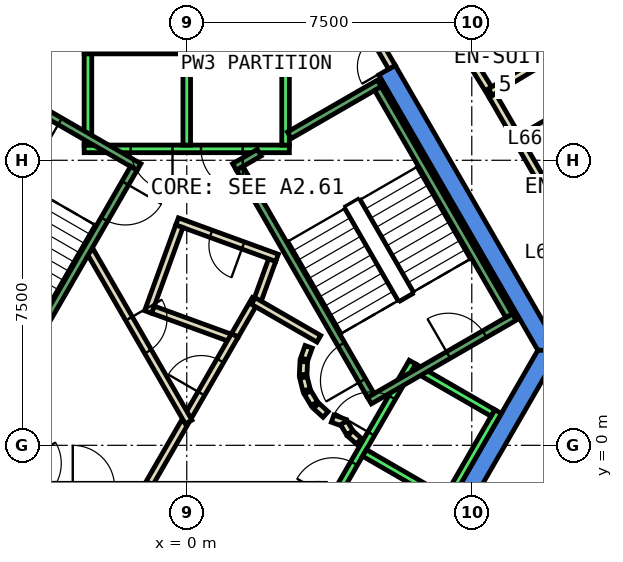
"""IFC4 building model, lengths in metres.
Left out: names, types, materials, properties, quantities, classifications, styles, units other than length and angle.
Written with IfcOpenShell. Run it as: python <this file> out.ifc"""

import sys

from ifc_helpers import new_model, si_unit, direction, frame, frame_2d, origin, place, context, subcontext, project, spatial, polyline, rectangle, outline, extrude, element, fill, save


model = new_model("IFC4")
c1 = context("Model", 3, precision=1e-05, world=origin(), true_north=direction((0.0, 1.0)))
c2 = subcontext(c1, "Body", "Model", "MODEL_VIEW")
j1 = project(units=[si_unit("LENGTHUNIT", "METRE"), si_unit("PLANEANGLEUNIT", "RADIAN")], contexts=[c1])
p1 = place(None, origin())
s1 = spatial("IfcSite", under=j1, at=p1, CompositionType="ELEMENT")
p2 = place(p1, origin())
s2 = spatial("IfcBuilding", under=s1, at=p2, CompositionType="ELEMENT")
p3 = place(p2, frame((0.0, 0.0, 286.4)))
s3 = spatial("IfcBuildingStorey", under=s2, at=p3, CompositionType="ELEMENT", Elevation=286.4)
p4 = place(p3, frame((0.0, 0.0, -0.6)))
e1 = element("IfcWall", 1, at=p4, inside=s3, PredefinedType="SHEAR", context=c2, shape_type="SweptSolid", body=[
    extrude(outline(polyline([(5.486, 9.998), (5.053, 9.748), (9.238, 2.5), (9.815, 2.5), (5.486, 9.998)])), origin(), (0.0, 0.0, 1.0), 3.86),
])
p5 = place(p3, frame((0.0, 0.0, -0.6)))
e2 = element("IfcWall", 2, at=p5, inside=s3, PredefinedType="SHEAR", context=c2, shape_type="SweptSolid", body=[
    extrude(outline(polyline([(4.907, -6.0), (9.815, 2.5), (9.238, 2.5), (4.619, -5.5), (4.907, -6.0)])), origin(), (0.0, 0.0, 1.0), 3.86),
])
p6 = place(p3, frame((1.264, 2.89, 0.0), z_axis=(0.0, 0.0, 1.0), x_axis=(0.500043792738, 0.866000118559, 0.0)))
e3 = element("IfcWall", 3, at=p6, inside=s3, PredefinedType="PARTITIONING", context=c2, shape_type="SweptSolid", body=[
    extrude(rectangle(XDim=1.096, YDim=0.2, at=frame_2d((0.548, 0.0))), origin(), (0.0, 0.0, 1.0), 3.26),
])
p7 = place(p3, frame((1.838, 3.748, 0.0), z_axis=(0.0, 0.0, 1.0), x_axis=(0.342266462435, 0.939602931398, 0.0)))
e4 = element("IfcWall", 4, at=p7, inside=s3, PredefinedType="PARTITIONING", context=c2, shape_type="SweptSolid", body=[
    extrude(rectangle(XDim=1.198, YDim=0.2, at=frame_2d((0.599, 0.0))), origin(), (0.0, 0.0, 1.0), 3.26),
])
p8 = place(p3, frame((2.376, 4.934, 0.0), z_axis=(0.0, 0.0, 1.0), x_axis=(-0.939640574808, 0.342163104635, 0.0)))
e5 = element("IfcWall", 5, at=p8, inside=s3, PredefinedType="PARTITIONING", context=c2, shape_type="SweptSolid", body=[
    extrude(rectangle(XDim=2.8, YDim=0.2, at=frame_2d((1.4, 0.0))), origin(), (0.0, 0.0, 1.0), 3.26),
])
p9 = place(p8, frame((0.95, 0.0, 0.0)))
e6 = element("IfcOpeningElement", 6, at=p9, cuts=e5, PredefinedType="OPENING", context=c2, shape_type="SweptSolid", body=[
    extrude(rectangle(XDim=0.9, YDim=2.1, at=frame_2d((0.45, 1.05))), frame((0.0, 0.11, 0.0), z_axis=(0.0, -1.0, 0.0), x_axis=(1.0, 0.0, 0.0)), (0.0, 0.0, 1.0), 0.22),
])
p10 = place(p3, frame((-0.196, 5.764, 0.0), z_axis=(0.0, 0.0, 1.0), x_axis=(-0.34165322761, -0.939826086073, 0.0)))
e7 = element("IfcWall", 7, at=p10, inside=s3, PredefinedType="PARTITIONING", context=c2, shape_type="SweptSolid", body=[
    extrude(rectangle(XDim=2.4, YDim=0.2, at=frame_2d((1.2, 0.0))), origin(), (0.0, 0.0, 1.0), 3.26),
])
p11 = place(p3, frame((-0.888, 3.568, 0.0), z_axis=(0.0, 0.0, 1.0), x_axis=(0.939685034098, -0.34204098686, 0.0)))
e8 = element("IfcWall", 8, at=p11, inside=s3, PredefinedType="PARTITIONING", context=c2, shape_type="SweptSolid", body=[
    extrude(rectangle(XDim=2.237, YDim=0.2, at=frame_2d((1.119, 0.0))), origin(), (0.0, 0.0, 1.0), 3.26),
])
p12 = place(p3, frame((8.039, 9.209, 0.0), z_axis=(0.0, 0.0, 1.0), x_axis=(0.500219543227, -0.865898613334, 0.0)))
e9 = element("IfcWall", 9, at=p12, inside=s3, PredefinedType="PARTITIONING", context=c2, shape_type="SweptSolid", body=[
    extrude(rectangle(XDim=1.261, YDim=0.2, at=frame_2d((0.631, 0.0))), origin(), (0.0, 0.0, 1.0), 3.26),
])
p13 = place(p3, frame((8.67, 8.117, 0.0), z_axis=(0.0, 0.0, 1.0), x_axis=(0.50002537861, -0.866010750942, 0.0)))
e10 = element("IfcWall", 10, at=p13, inside=s3, PredefinedType="PARTITIONING", context=c2, shape_type="SweptSolid", body=[
    extrude(rectangle(XDim=3.0, YDim=0.2, at=frame_2d((1.5, 0.0))), origin(), (0.0, 0.0, 1.0), 3.26),
])
p14 = place(p3, frame((6.775, 11.249, 0.0), z_axis=(0.0, 0.0, 1.0), x_axis=(0.527803270752, -0.849366650736, 0.0)))
e11 = element("IfcWall", 11, at=p14, inside=s3, PredefinedType="PARTITIONING", context=c2, shape_type="SweptSolid", body=[
    extrude(rectangle(XDim=2.401, YDim=0.2, at=frame_2d((1.2, 0.0))), origin(), (0.0, 0.0, 1.0), 3.26),
])
p15 = place(p3, frame((-0.982, -1.0, 0.0), z_axis=(0.0, 0.0, 1.0), x_axis=(0.50024047865, 0.865886518847, 0.0)))
e12 = element("IfcWall", 12, at=p15, inside=s3, PredefinedType="PARTITIONING", context=c2, shape_type="SweptSolid", body=[
    extrude(rectangle(XDim=1.863, YDim=0.2, at=frame_2d((0.931, 0.0))), origin(), (0.0, 0.0, 1.0), 3.26),
])
p16 = place(p3, frame((0.05, 0.787, 0.0), z_axis=(0.0, 0.0, 1.0), x_axis=(0.499945861543, 0.866056658381, 0.0)))
e13 = element("IfcWall", 13, at=p16, inside=s3, PredefinedType="PARTITIONING", context=c2, shape_type="SweptSolid", body=[
    extrude(rectangle(XDim=2.428, YDim=0.2, at=frame_2d((1.214, 0.0))), origin(), (0.0, 0.0, 1.0), 3.26),
])
p17 = place(p16, frame((0.664, 0.0, 0.0)))
e14 = element("IfcOpeningElement", 14, at=p17, cuts=e13, PredefinedType="OPENING", context=c2, shape_type="SweptSolid", body=[
    extrude(rectangle(XDim=1.0, YDim=2.1, at=frame_2d((0.5, 1.05))), frame((0.0, 0.11, 0.0), z_axis=(0.0, -1.0, 0.0), x_axis=(1.0, 0.0, 0.0)), (0.0, 0.0, 1.0), 0.22),
])
p18 = place(p3, frame((1.751, 3.798, 0.0), z_axis=(0.0, 0.0, 1.0), x_axis=(0.866091650241, -0.499885240213, 0.0)))
e15 = element("IfcWall", 15, at=p18, inside=s3, PredefinedType="PARTITIONING", context=c2, shape_type="SweptSolid", body=[
    extrude(rectangle(XDim=1.991, YDim=0.2, at=frame_2d((0.995, 0.0))), origin(), (0.0, 0.0, 1.0), 3.26),
])
p19 = place(p3, frame((3.208, 2.592, 0.0), z_axis=(0.0, 0.0, 1.0), x_axis=(-0.337388820924, -0.941365382578, 0.0)))
e16 = element("IfcWall", 16, at=p19, inside=s3, PredefinedType="PARTITIONING", context=c2, shape_type="SweptSolid", body=[
    extrude(rectangle(XDim=0.338, YDim=0.2, at=frame_2d((0.169, 0.0))), origin(), (0.0, 0.0, 1.0), 3.26),
])
p20 = place(p3, frame((3.079, 2.199, 0.0), z_axis=(0.0, 0.0, 1.0), x_axis=(-0.047771483479, -0.998858290933, 0.0)))
e17 = element("IfcWall", 17, at=p20, inside=s3, PredefinedType="PARTITIONING", context=c2, shape_type="SweptSolid", body=[
    extrude(rectangle(XDim=0.337, YDim=0.2, at=frame_2d((0.169, 0.0))), origin(), (0.0, 0.0, 1.0), 3.26),
])
p21 = place(p3, frame((3.07, 1.786, 0.0), z_axis=(0.0, 0.0, 1.0), x_axis=(0.242705583207, -0.970099994784, 0.0)))
e18 = element("IfcWall", 18, at=p21, inside=s3, PredefinedType="PARTITIONING", context=c2, shape_type="SweptSolid", body=[
    extrude(rectangle(XDim=0.338, YDim=0.2, at=frame_2d((0.169, 0.0))), origin(), (0.0, 0.0, 1.0), 3.26),
])
for number, where, z_axis, x_axis in (
    (19, (3.182, 1.388, 0.0), (0.0, 0.0, 1.0), (0.512, -0.859, 0.0)),
    (20, (3.404, 1.039, 0.0), (0.0, 0.0, 1.0), (0.74, -0.672, 0.0)),
):
    element("IfcWall", number, at=place(p3, frame(where, z_axis=z_axis, x_axis=x_axis)), inside=s3, PredefinedType="PARTITIONING", context=c2, shape_type="SweptSolid", body=[
        extrude(rectangle(XDim=0.338, YDim=0.2, at=frame_2d((0.169, 0.0))), origin(), (0.0, 0.0, 1.0), 3.26),
    ])
p22 = place(p3, frame((3.838, 0.702, 0.0), z_axis=(0.0, 0.0, 1.0), x_axis=(0.941035081519, -0.338308993895, 0.0)))
e21 = element("IfcWall", 21, at=p22, inside=s3, PredefinedType="PARTITIONING", context=c2, shape_type="SweptSolid", body=[
    extrude(rectangle(XDim=0.337, YDim=0.2, at=frame_2d((0.168, 0.0))), origin(), (0.0, 0.0, 1.0), 3.26),
])
p23 = place(p3, frame((4.132, 0.593, 0.0), z_axis=(0.0, 0.0, 1.0), x_axis=(0.513561617048, -0.858052717201, 0.0)))
e22 = element("IfcWall", 22, at=p23, inside=s3, PredefinedType="PARTITIONING", context=c2, shape_type="SweptSolid", body=[
    extrude(rectangle(XDim=0.308, YDim=0.2, at=frame_2d((0.154, 0.0))), origin(), (0.0, 0.0, 1.0), 3.26),
])
p24 = place(p3, frame((4.301, 0.315, 0.0), z_axis=(0.0, 0.0, 1.0), x_axis=(0.741798017506, -0.670623367639, 0.0)))
e23 = element("IfcWall", 23, at=p24, inside=s3, PredefinedType="PARTITIONING", context=c2, shape_type="SweptSolid", body=[
    extrude(rectangle(XDim=0.309, YDim=0.2, at=frame_2d((0.154, 0.0))), origin(), (0.0, 0.0, 1.0), 3.26),
])
p25 = place(p3, frame((-2.54, 5.1, 0.0), z_axis=(0.0, 0.0, 1.0), x_axis=(0.499925051871, -0.866068670783, 0.0)))
e24 = element("IfcWall", 24, at=p25, inside=s3, PredefinedType="PARTITIONING", context=c2, shape_type="SweptSolid", body=[
    extrude(rectangle(XDim=5.181, YDim=0.2, at=frame_2d((2.59, 0.0))), origin(), (0.0, 0.0, 1.0), 3.26),
])
p26 = place(p25, frame((2.04, 0.0, 0.0)))
e25 = element("IfcOpeningElement", 25, at=p26, cuts=e24, PredefinedType="OPENING", context=c2, shape_type="SweptSolid", body=[
    extrude(rectangle(XDim=1.0, YDim=2.1, at=frame_2d((0.5, 1.05))), frame((0.0, 0.11, 0.0), z_axis=(0.0, -1.0, 0.0), x_axis=(1.0, 0.0, 0.0)), (0.0, 0.0, 1.0), 0.22),
])
p27 = place(p3, frame((10.885, 9.28, 0.0), z_axis=(0.0, 0.0, 1.0), x_axis=(-0.866022959057, -0.500004234368, 0.0)))
e26 = element("IfcWall", 26, at=p27, inside=s3, PredefinedType="PARTITIONING", context=c2, shape_type="SweptSolid", body=[
    extrude(rectangle(XDim=2.5, YDim=0.2, at=frame_2d((1.25, 0.0))), origin(), (0.0, 0.0, 1.0), 3.26),
])
p28 = place(p3, frame((7.989, 9.295, 0.0), z_axis=(0.0, 0.0, 1.0), x_axis=(0.857801856135, 0.513980520654, 0.0)))
e27 = element("IfcWall", 27, at=p28, inside=s3, PredefinedType="PARTITIONING", context=c2, shape_type="SweptSolid", body=[
    extrude(rectangle(XDim=2.3, YDim=0.2, at=frame_2d((1.15, 0.0))), origin(), (0.0, 0.0, 1.0), 3.26),
])
p29 = place(p3, frame((5.399, 9.948, 0.0), z_axis=(0.0, 0.0, 1.0), x_axis=(-0.499882215713, 0.866093395895, 0.0)))
e28 = element("IfcWall", 28, at=p29, inside=s3, PredefinedType="PARTITIONING", context=c2, shape_type="SweptSolid", body=[
    extrude(rectangle(XDim=0.926, YDim=0.2, at=frame_2d((0.463, 0.0))), origin(), (0.0, 0.0, 1.0), 2.4),
])
p30 = place(p29, frame((0.017, 0.0, 0.0)))
e29 = element("IfcOpeningElement", 29, at=p30, cuts=e28, PredefinedType="OPENING", context=c2, shape_type="SweptSolid", body=[
    extrude(rectangle(XDim=0.9, YDim=2.1, at=frame_2d((0.45, 1.05))), frame((0.0, 0.11, 0.0), z_axis=(0.0, -1.0, 0.0), x_axis=(1.0, 0.0, 0.0)), (0.0, 0.0, 1.0), 0.22),
])
p31 = place(p3, frame((2.7, 7.8, 0.0), z_axis=(0.0, 0.0, 1.0), x_axis=(-1.0, 0.0, 0.0)))
e30 = element("IfcWall", 30, at=p31, inside=s3, PredefinedType="STANDARD", context=c2, shape_type="SweptSolid", body=[
    extrude(rectangle(XDim=5.4, YDim=0.2, at=frame_2d((2.7, 0.0))), origin(), (0.0, 0.0, 1.0), 3.26),
])
p32 = place(p31, frame((1.225, 0.0, 0.0)))
e31 = element("IfcOpeningElement", 31, at=p32, cuts=e30, PredefinedType="OPENING", context=c2, shape_type="SweptSolid", body=[
    extrude(rectangle(XDim=1.1, YDim=2.1, at=frame_2d((0.55, 1.05))), frame((0.0, 0.11, 0.0), z_axis=(0.0, -1.0, 0.0), x_axis=(1.0, 0.0, 0.0)), (0.0, 0.0, 1.0), 0.22),
])
p33 = place(p31, frame((3.075, 0.0, 0.0)))
e32 = element("IfcOpeningElement", 32, at=p33, cuts=e30, PredefinedType="OPENING", context=c2, shape_type="SweptSolid", body=[
    extrude(rectangle(XDim=1.1, YDim=2.1, at=frame_2d((0.55, 1.05))), frame((0.0, 0.11, 0.0), z_axis=(0.0, -1.0, 0.0), x_axis=(1.0, 0.0, 0.0)), (0.0, 0.0, 1.0), 0.22),
])
p34 = place(p3, frame((2.7, 10.4, 0.0), z_axis=(0.0, 0.0, 1.0), x_axis=(-1.0, 0.0, 0.0)))
e33 = element("IfcWall", 33, at=p34, inside=s3, PredefinedType="STANDARD", context=c2, shape_type="SweptSolid", body=[
    extrude(rectangle(XDim=5.4, YDim=0.2, at=frame_2d((2.7, 0.0))), origin(), (0.0, 0.0, 1.0), 3.26),
])
for number, where, z_axis, x_axis in (
    (34, (2.6, 7.9, 0.0), (0.0, 0.0, 1.0), (0.0, 1.0, 0.0)),
    (35, (0.0, 7.9, 0.0), (0.0, 0.0, 1.0), (0.0, 1.0, 0.0)),
    (36, (-2.6, 7.9, 0.0), (0.0, 0.0, 1.0), (0.0, 1.0, 0.0)),
):
    element("IfcWall", number, at=place(p3, frame(where, z_axis=z_axis, x_axis=x_axis)), inside=s3, PredefinedType="STANDARD", context=c2, shape_type="SweptSolid", body=[
        extrude(rectangle(XDim=2.4, YDim=0.2, at=frame_2d((1.2, 0.0))), origin(), (0.0, 0.0, 1.0), 3.26),
    ])
p35 = place(p3, frame((-5.94, 2.188, 0.0), z_axis=(0.0, 0.0, 1.0), x_axis=(0.500034260056, -0.866005622828, 0.0)))
e37 = element("IfcWall", 37, at=p35, inside=s3, PredefinedType="STANDARD", context=c2, shape_type="SweptSolid", body=[
    extrude(rectangle(XDim=5.399, YDim=0.2, at=frame_2d((2.7, 0.0))), origin(), (0.0, 0.0, 1.0), 3.26),
])
p36 = place(p35, frame((3.075, 0.0, 0.0)))
e38 = element("IfcOpeningElement", 38, at=p36, cuts=e37, PredefinedType="OPENING", context=c2, shape_type="SweptSolid", body=[
    extrude(rectangle(XDim=1.1, YDim=2.1, at=frame_2d((0.55, 1.05))), frame((0.0, 0.11, 0.0), z_axis=(0.0, -1.0, 0.0), x_axis=(1.0, 0.0, 0.0)), (0.0, 0.0, 1.0), 0.22),
])
p37 = place(p35, frame((1.225, 0.0, 0.0)))
e39 = element("IfcOpeningElement", 39, at=p37, cuts=e37, PredefinedType="OPENING", context=c2, shape_type="SweptSolid", body=[
    extrude(rectangle(XDim=1.1, YDim=2.1, at=frame_2d((0.55, 1.05))), frame((0.0, 0.11, 0.0), z_axis=(0.0, -1.0, 0.0), x_axis=(1.0, 0.0, 0.0)), (0.0, 0.0, 1.0), 0.22),
])
p38 = place(p3, frame((3.24, -2.488, 0.0), z_axis=(0.0, 0.0, 1.0), x_axis=(0.500034260056, 0.866005622828, 0.0)))
e40 = element("IfcWall", 40, at=p38, inside=s3, PredefinedType="STANDARD", context=c2, shape_type="SweptSolid", body=[
    extrude(rectangle(XDim=5.399, YDim=0.2, at=frame_2d((2.7, 0.0))), origin(), (0.0, 0.0, 1.0), 3.26),
])
p39 = place(p38, frame((3.225, 0.0, 0.0)))
e41 = element("IfcOpeningElement", 41, at=p39, cuts=e40, PredefinedType="OPENING", context=c2, shape_type="SweptSolid", body=[
    extrude(rectangle(XDim=1.1, YDim=2.1, at=frame_2d((0.55, 1.05))), frame((0.0, 0.11, 0.0), z_axis=(0.0, -1.0, 0.0), x_axis=(1.0, 0.0, 0.0)), (0.0, 0.0, 1.0), 0.22),
])
p40 = place(p38, frame((1.225, 0.0, 0.0)))
e42 = element("IfcOpeningElement", 42, at=p40, cuts=e40, PredefinedType="OPENING", context=c2, shape_type="SweptSolid", body=[
    extrude(rectangle(XDim=1.1, YDim=2.1, at=frame_2d((0.55, 1.05))), frame((0.0, 0.11, 0.0), z_axis=(0.0, -1.0, 0.0), x_axis=(1.0, 0.0, 0.0)), (0.0, 0.0, 1.0), 0.22),
])
p41 = place(p3, frame((5.492, -3.788, 0.0), z_axis=(0.0, 0.0, 1.0), x_axis=(0.500034260056, 0.866005622828, 0.0)))
e43 = element("IfcWall", 43, at=p41, inside=s3, PredefinedType="STANDARD", context=c2, shape_type="SweptSolid", body=[
    extrude(rectangle(XDim=5.399, YDim=0.2, at=frame_2d((2.7, 0.0))), origin(), (0.0, 0.0, 1.0), 3.26),
])
for number, where, z_axis, x_axis in (
    (44, (4.677, -0.2, 0.0), (0.0, 0.0, 1.0), (0.866, -0.5, 0.0)),
    (45, (5.977, 2.052, 0.0), (0.0, 0.0, 1.0), (0.866, -0.5, 0.0)),
):
    element("IfcWall", number, at=place(p3, frame(where, z_axis=z_axis, x_axis=x_axis)), inside=s3, PredefinedType="STANDARD", context=c2, shape_type="SweptSolid", body=[
        extrude(rectangle(XDim=2.399, YDim=0.2, at=frame_2d((1.2, 0.0))), origin(), (0.0, 0.0, 1.0), 3.26),
    ])
p42 = place(p3, frame((4.806, 1.176, 0.0), z_axis=(0.0, 0.0, 1.0), x_axis=(0.866059941101, 0.499940174841, 0.0)))
e46 = element("IfcWall", 46, at=p42, inside=s3, PredefinedType="STANDARD", context=c2, shape_type="SweptSolid", body=[
    extrude(rectangle(XDim=4.4, YDim=0.2, at=frame_2d((2.2, 0.0))), origin(), (0.0, 0.0, 1.0), 3.26),
])
p43 = place(p42, frame((2.4, 0.0, 0.0)))
e47 = element("IfcOpeningElement", 47, at=p43, cuts=e46, PredefinedType="OPENING", context=c2, shape_type="SweptSolid", body=[
    extrude(rectangle(XDim=1.1, YDim=2.2, at=frame_2d((0.55, 1.1))), frame((0.0, 0.11, 0.0), z_axis=(0.0, -1.0, 0.0), x_axis=(1.0, 0.0, 0.0)), (0.0, 0.0, 1.0), 0.22),
])
p44 = place(p3, frame((2.7, 8.158, 0.0), z_axis=(0.0, 0.0, 1.0), x_axis=(0.86611865017, 0.499838457731, 0.0)))
e48 = element("IfcWall", 48, at=p44, inside=s3, PredefinedType="STANDARD", context=c2, shape_type="SweptSolid", body=[
    extrude(rectangle(XDim=2.733, YDim=0.2, at=frame_2d((1.366, 0.0))), origin(), (0.0, 0.0, 1.0), 3.26),
])
p45 = place(p3, frame((1.256, 7.324, 0.0), z_axis=(0.0, 0.0, 1.0), x_axis=(0.865915093549, 0.500191014278, 0.0)))
e49 = element("IfcWall", 49, at=p45, inside=s3, PredefinedType="STANDARD", context=c2, shape_type="SweptSolid", body=[
    extrude(rectangle(XDim=0.752, YDim=0.2, at=frame_2d((0.376, 0.0))), origin(), (0.0, 0.0, 1.0), 3.26),
])
p46 = place(p3, frame((4.843, 1.312, 0.0), z_axis=(0.0, 0.0, 1.0), x_axis=(-0.499963383562, 0.866046543262, 0.0)))
e50 = element("IfcWall", 50, at=p46, inside=s3, PredefinedType="STANDARD", context=c2, shape_type="SweptSolid", body=[
    extrude(rectangle(XDim=6.9, YDim=0.2, at=frame_2d((3.45, 0.0))), origin(), (0.0, 0.0, 1.0), 3.26),
])
p47 = place(p46, frame((0.45, 0.0, 0.0)))
e51 = element("IfcOpeningElement", 51, at=p47, cuts=e50, PredefinedType="OPENING", context=c2, shape_type="SweptSolid", body=[
    extrude(rectangle(XDim=1.1, YDim=2.2, at=frame_2d((0.55, 1.1))), frame((0.0, 0.11, 0.0), z_axis=(0.0, -1.0, 0.0), x_axis=(1.0, 0.0, 0.0)), (0.0, 0.0, 1.0), 0.22),
])
p48 = place(p3, frame((8.48, 3.412, 0.0), z_axis=(0.0, 0.0, 1.0), x_axis=(-0.499978703459, 0.866037698999, 0.0)))
e52 = element("IfcWall", 52, at=p48, inside=s3, PredefinedType="STANDARD", context=c2, shape_type="SweptSolid", body=[
    extrude(rectangle(XDim=6.9, YDim=0.2, at=frame_2d((3.45, 0.0))), origin(), (0.0, 0.0, 1.0), 3.26),
])
p49 = place(p3, frame((-1.256, 7.324, 0.0), z_axis=(0.0, 0.0, 1.0), x_axis=(-0.866046073146, 0.499964197906, 0.0)))
e53 = element("IfcWall", 53, at=p49, inside=s3, PredefinedType="STANDARD", context=c2, shape_type="SweptSolid", body=[
    extrude(rectangle(XDim=4.4, YDim=0.2, at=frame_2d((2.2, 0.0))), origin(), (0.0, 0.0, 1.0), 3.26),
])
p50 = place(p49, frame((2.4, 0.0, 0.0)))
e54 = element("IfcOpeningElement", 54, at=p50, cuts=e53, PredefinedType="OPENING", context=c2, shape_type="SweptSolid", body=[
    extrude(rectangle(XDim=1.1, YDim=2.2, at=frame_2d((0.55, 1.1))), frame((0.0, 0.11, 0.0), z_axis=(0.0, -1.0, 0.0), x_axis=(1.0, 0.0, 0.0)), (0.0, 0.0, 1.0), 0.22),
])
p51 = place(p3, frame((-1.393, 7.288, 0.0), z_axis=(0.0, 0.0, 1.0), x_axis=(-0.499963383562, -0.866046543262, 0.0)))
e55 = element("IfcWall", 55, at=p51, inside=s3, PredefinedType="STANDARD", context=c2, shape_type="SweptSolid", body=[
    extrude(rectangle(XDim=6.9, YDim=0.2, at=frame_2d((3.45, 0.0))), origin(), (0.0, 0.0, 1.0), 3.26),
])
p52 = place(p51, frame((0.45, 0.0, 0.0)))
e56 = element("IfcOpeningElement", 56, at=p52, cuts=e55, PredefinedType="OPENING", context=c2, shape_type="SweptSolid", body=[
    extrude(rectangle(XDim=1.1, YDim=2.2, at=frame_2d((0.55, 1.1))), frame((0.0, 0.11, 0.0), z_axis=(0.0, -1.0, 0.0), x_axis=(1.0, 0.0, 0.0)), (0.0, 0.0, 1.0), 0.22),
])
p53 = place(p17, origin())
e57 = element("IfcDoor", 57, at=p53, inside=s3, OperationType="SINGLE_SWING_RIGHT", PredefinedType="DOOR", context=c2, shape_type="SweptSolid", body=[
    extrude(rectangle(XDim=1.0, YDim=2.1, at=frame_2d((0.5, 1.05))), frame((0.0, 0.025, 0.0), z_axis=(0.0, -1.0, 0.0), x_axis=(1.0, 0.0, 0.0)), (0.0, 0.0, 1.0), 0.05),
])
fill(e14, e57)
p54 = place(p26, origin())
e58 = element("IfcDoor", 58, at=p54, inside=s3, OperationType="SINGLE_SWING_RIGHT", PredefinedType="DOOR", context=c2, shape_type="SweptSolid", body=[
    extrude(rectangle(XDim=1.0, YDim=2.1, at=frame_2d((0.5, 1.05))), frame((0.0, 0.025, 0.0), z_axis=(0.0, -1.0, 0.0), x_axis=(1.0, 0.0, 0.0)), (0.0, 0.0, 1.0), 0.05),
])
fill(e25, e58)
p55 = place(p9, origin())
e59 = element("IfcDoor", 59, at=p55, inside=s3, OperationType="SINGLE_SWING_LEFT", PredefinedType="DOOR", context=c2, shape_type="SweptSolid", body=[
    extrude(rectangle(XDim=0.9, YDim=2.1, at=frame_2d((0.45, 1.05))), frame((0.0, 0.025, 0.0), z_axis=(0.0, -1.0, 0.0), x_axis=(1.0, 0.0, 0.0)), (0.0, 0.0, 1.0), 0.05),
])
fill(e6, e59)
p56 = place(p30, origin())
e60 = element("IfcDoor", 60, at=p56, inside=s3, OperationType="SINGLE_SWING_LEFT", PredefinedType="DOOR", context=c2, shape_type="SweptSolid", body=[
    extrude(rectangle(XDim=0.9, YDim=2.1, at=frame_2d((0.45, 1.05))), frame((0.0, 0.025, 0.0), z_axis=(0.0, -1.0, 0.0), x_axis=(1.0, 0.0, 0.0)), (0.0, 0.0, 1.0), 0.05),
])
fill(e29, e60)
p57 = place(p32, origin())
e61 = element("IfcDoor", 61, at=p57, inside=s3, OperationType="SLIDING_TO_LEFT", PredefinedType="DOOR", context=c2, shape_type="SweptSolid", body=[
    extrude(rectangle(XDim=1.1, YDim=2.1, at=frame_2d((0.55, 1.05))), frame((0.0, 0.025, 0.0), z_axis=(0.0, -1.0, 0.0), x_axis=(1.0, 0.0, 0.0)), (0.0, 0.0, 1.0), 0.05),
])
fill(e31, e61)
p58 = place(p33, origin())
e62 = element("IfcDoor", 62, at=p58, inside=s3, OperationType="SLIDING_TO_LEFT", PredefinedType="DOOR", context=c2, shape_type="SweptSolid", body=[
    extrude(rectangle(XDim=1.1, YDim=2.1, at=frame_2d((0.55, 1.05))), frame((0.0, 0.025, 0.0), z_axis=(0.0, -1.0, 0.0), x_axis=(1.0, 0.0, 0.0)), (0.0, 0.0, 1.0), 0.05),
])
fill(e32, e62)
p59 = place(p39, origin())
e63 = element("IfcDoor", 63, at=p59, inside=s3, OperationType="SLIDING_TO_LEFT", PredefinedType="DOOR", context=c2, shape_type="SweptSolid", body=[
    extrude(rectangle(XDim=1.1, YDim=2.1, at=frame_2d((0.55, 1.05))), frame((0.0, 0.025, 0.0), z_axis=(0.0, -1.0, 0.0), x_axis=(1.0, 0.0, 0.0)), (0.0, 0.0, 1.0), 0.05),
])
fill(e41, e63)
p60 = place(p40, origin())
e64 = element("IfcDoor", 64, at=p60, inside=s3, OperationType="SLIDING_TO_LEFT", PredefinedType="DOOR", context=c2, shape_type="SweptSolid", body=[
    extrude(rectangle(XDim=1.1, YDim=2.1, at=frame_2d((0.55, 1.05))), frame((0.0, 0.025, 0.0), z_axis=(0.0, -1.0, 0.0), x_axis=(1.0, 0.0, 0.0)), (0.0, 0.0, 1.0), 0.05),
])
fill(e42, e64)
p61 = place(p47, origin())
e65 = element("IfcDoor", 65, at=p61, inside=s3, OperationType="SINGLE_SWING_LEFT", PredefinedType="DOOR", context=c2, shape_type="SweptSolid", body=[
    extrude(rectangle(XDim=1.1, YDim=2.2, at=frame_2d((0.55, 1.1))), frame((0.0, 0.025, 0.0), z_axis=(0.0, -1.0, 0.0), x_axis=(1.0, 0.0, 0.0)), (0.0, 0.0, 1.0), 0.05),
])
fill(e51, e65)
p62 = place(p43, origin())
e66 = element("IfcDoor", 66, at=p62, inside=s3, OperationType="SINGLE_SWING_LEFT", PredefinedType="DOOR", context=c2, shape_type="SweptSolid", body=[
    extrude(rectangle(XDim=1.1, YDim=2.2, at=frame_2d((0.55, 1.1))), frame((0.0, 0.025, 0.0), z_axis=(0.0, -1.0, 0.0), x_axis=(1.0, 0.0, 0.0)), (0.0, 0.0, 1.0), 0.05),
])
fill(e47, e66)
p63 = place(p52, origin())
e67 = element("IfcDoor", 67, at=p63, inside=s3, OperationType="SINGLE_SWING_LEFT", PredefinedType="DOOR", context=c2, shape_type="SweptSolid", body=[
    extrude(rectangle(XDim=1.1, YDim=2.2, at=frame_2d((0.55, 1.1))), frame((0.0, 0.025, 0.0), z_axis=(0.0, -1.0, 0.0), x_axis=(1.0, 0.0, 0.0)), (0.0, 0.0, 1.0), 0.05),
])
fill(e56, e67)
p64 = place(p50, origin())
e68 = element("IfcDoor", 68, at=p64, inside=s3, OperationType="SINGLE_SWING_LEFT", PredefinedType="DOOR", context=c2, shape_type="SweptSolid", body=[
    extrude(rectangle(XDim=1.1, YDim=2.2, at=frame_2d((0.55, 1.1))), frame((0.0, 0.025, 0.0), z_axis=(0.0, -1.0, 0.0), x_axis=(1.0, 0.0, 0.0)), (0.0, 0.0, 1.0), 0.05),
])
fill(e54, e68)
save(model, sys.argv[1])
